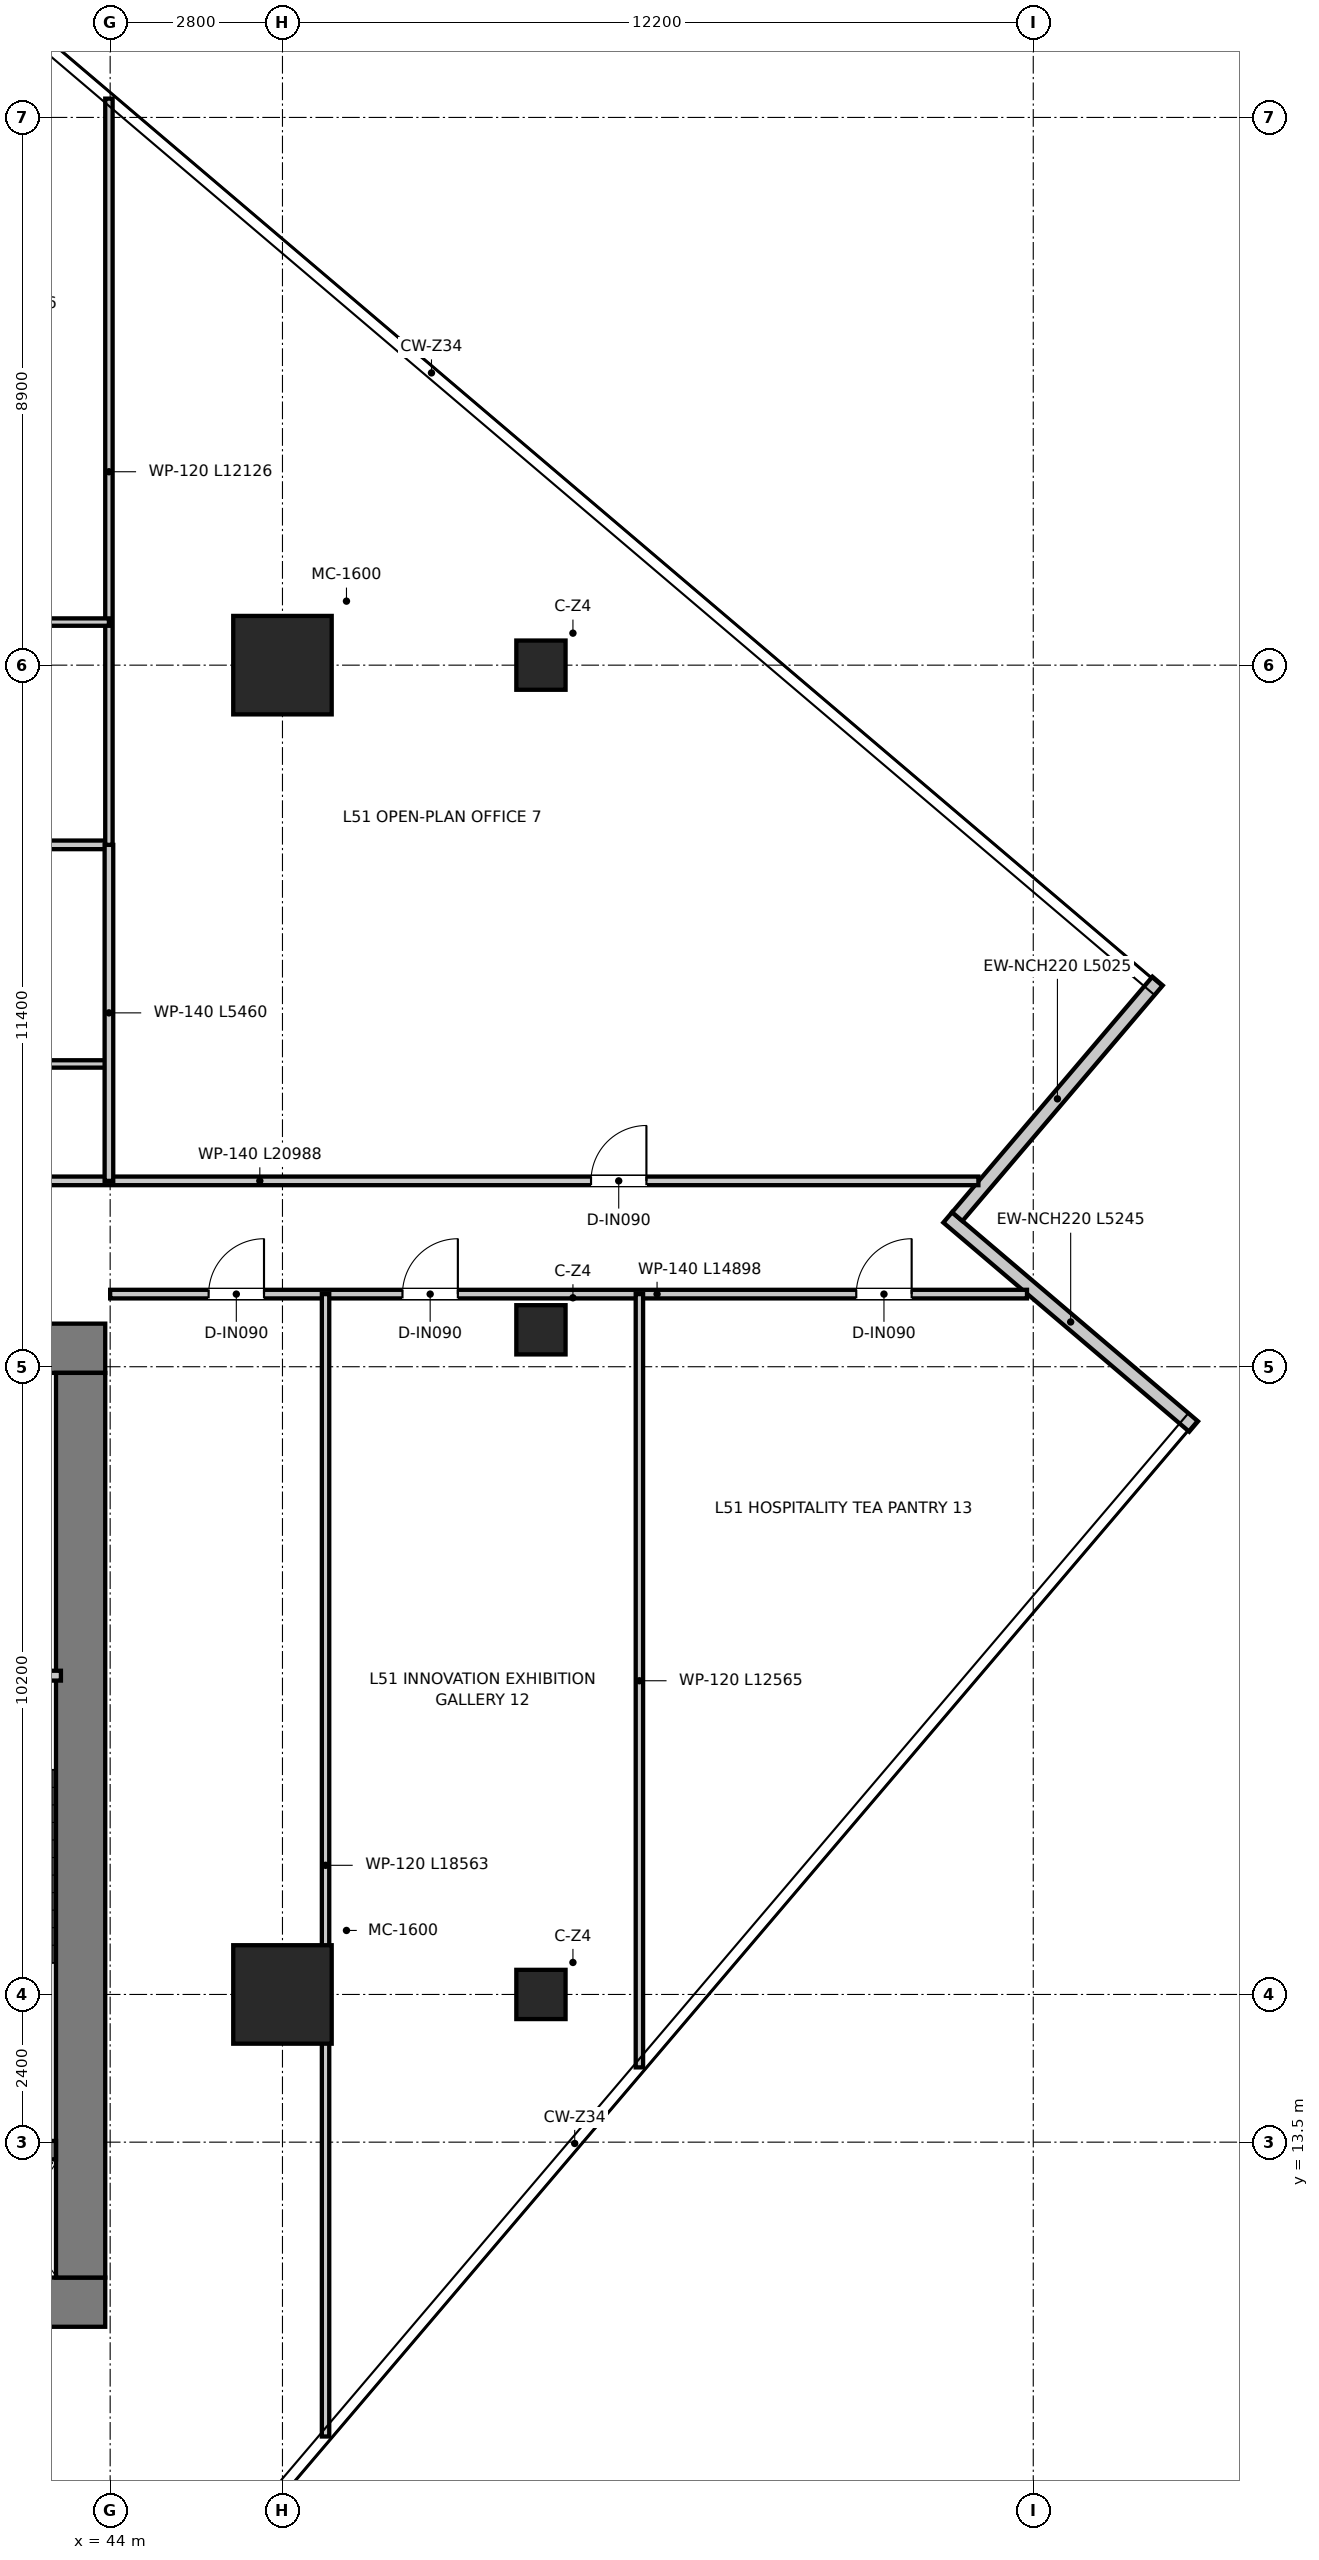
"""IFC4 building model, lengths in metres.
Left out: names, types, materials, properties, quantities, classifications, styles, units other than length and angle.
Written with IfcOpenShell. Run it as: python <this file> out.ifc"""

import sys

from ifc_helpers import new_model, si_unit, direction, frame, frame_2d, origin, origin_2d, place, context, subcontext, project, spatial, rectangle, extrude, source, transform, mapped, element, fill, save


model = new_model("IFC4")
c1 = context("Model", 3, precision=1e-05, world=origin(), true_north=direction((0.0, 1.0)))
c2 = subcontext(c1, "Body", "Model", "MODEL_VIEW")
j1 = project(units=[si_unit("LENGTHUNIT", "METRE"), si_unit("PLANEANGLEUNIT", "RADIAN")], contexts=[c1])
p1 = place(None, origin())
s1 = spatial("IfcSite", under=j1, at=p1, CompositionType="ELEMENT")
p2 = place(p1, origin())
s2 = spatial("IfcBuilding", under=s1, at=p2, CompositionType="ELEMENT")
p3 = place(p2, frame((0.0, 0.0, 211.25)))
s3 = spatial("IfcBuildingStorey", under=s2, at=p3, CompositionType="ELEMENT", Elevation=211.25)
p4 = place(p3, frame((28.08, 10.9, 0.0), z_axis=(0.0, 0.0, 1.0), x_axis=(1.0, 0.0, 0.0)))
e1 = element("IfcWall", 1, at=p4, inside=s3, PredefinedType="SHEAR", context=c2, shape_type="SweptSolid", body=[
    extrude(rectangle(XDim=15.84, YDim=0.8, at=frame_2d((7.92, 0.0))), origin(), (0.0, 0.0, 1.0), 3.95),
])
p5 = place(p3, frame((28.08, 26.4, 0.0), z_axis=(0.0, 0.0, 1.0), x_axis=(1.0, 0.0, 0.0)))
e2 = element("IfcWall", 2, at=p5, inside=s3, PredefinedType="SHEAR", context=c2, shape_type="SweptSolid", body=[
    extrude(rectangle(XDim=15.84, YDim=0.8, at=frame_2d((7.92, 0.0))), origin(), (0.0, 0.0, 1.0), 3.95),
])
p6 = place(p5, frame((7.22, 0.0, 0.0)))
e3 = element("IfcOpeningElement", 3, at=p6, cuts=e2, PredefinedType="OPENING", context=c2, shape_type="SweptSolid", body=[
    extrude(rectangle(XDim=1.4, YDim=2.2, at=frame_2d((0.7, 1.1))), frame((0.0, 0.41, 0.0), z_axis=(0.0, -1.0, 0.0), x_axis=(1.0, 0.0, 0.0)), (0.0, 0.0, 1.0), 0.82),
])
p7 = place(p5, frame((1.775, 0.0, 0.0)))
e4 = element("IfcOpeningElement", 4, at=p7, cuts=e2, PredefinedType="OPENING", context=c2, shape_type="SweptSolid", body=[
    extrude(rectangle(XDim=1.05, YDim=2.1, at=frame_2d((0.525, 1.05))), frame((0.0, 0.41, 0.0), z_axis=(0.0, -1.0, 0.0), x_axis=(1.0, 0.0, 0.0)), (0.0, 0.0, 1.0), 0.82),
])
p8 = place(p5, frame((13.015, 0.0, 0.0)))
e5 = element("IfcOpeningElement", 5, at=p8, cuts=e2, PredefinedType="OPENING", context=c2, shape_type="SweptSolid", body=[
    extrude(rectangle(XDim=1.05, YDim=2.1, at=frame_2d((0.525, 1.05))), frame((0.0, 0.41, 0.0), z_axis=(0.0, -1.0, 0.0), x_axis=(1.0, 0.0, 0.0)), (0.0, 0.0, 1.0), 0.82),
])
p9 = place(p3, frame((43.52, 11.3, 0.0), z_axis=(0.0, 0.0, 1.0), x_axis=(0.0, 1.0, 0.0)))
e6 = element("IfcWall", 6, at=p9, inside=s3, PredefinedType="SHEAR", context=c2, shape_type="SweptSolid", body=[
    extrude(rectangle(XDim=14.7, YDim=0.8, at=frame_2d((7.35, 0.0))), origin(), (0.0, 0.0, 1.0), 3.95),
])
p10 = place(p3, frame((40.02, 13.37, 0.0), z_axis=(0.0, 0.0, 1.0), x_axis=(1.0, 0.0, 0.0)))
e7 = element("IfcWall", 7, at=p10, inside=s3, PredefinedType="SHEAR", context=c2, shape_type="SweptSolid", body=[
    extrude(rectangle(XDim=3.1, YDim=0.3, at=frame_2d((1.55, 0.0))), origin(), (0.0, 0.0, 1.0), 3.95),
])
m1 = source(origin(), c2, "Body", "SweptSolid", [
    extrude(rectangle(XDim=1.6, YDim=1.6, at=origin_2d()), origin(), (0.0, 0.0, 1.0), 3.95),
])
for number, where, z_axis, x_axis in (
    (8, (46.8, 15.9, 0.0), (0.0, 0.0, 1.0), (1.0, 0.0, 0.0)),
    (9, (46.8, 37.5, 0.0), (0.0, 0.0, 1.0), (1.0, 0.0, 0.0)),
):
    element("IfcColumn", number, at=place(p3, frame(where, z_axis=z_axis, x_axis=x_axis)), inside=s3, PredefinedType="USERDEFINED", context=c2, shape_type="MappedRepresentation", body=[
        mapped(m1, transform((0.0, 0.0, 0.0), x_axis=(1.0, 0.0, 0.0), y_axis=(0.0, 1.0, 0.0), z_axis=(0.0, 0.0, 1.0), scale=1.0)),
    ])
m2 = source(origin(), c2, "Body", "SweptSolid", [
    extrude(rectangle(XDim=0.8, YDim=0.8, at=origin_2d()), origin(), (0.0, 0.0, 1.0), 3.95),
])
for number, where, z_axis, x_axis in (
    (10, (51.0, 37.5, 0.0), (0.0, 0.0, 1.0), (1.0, 0.0, 0.0)),
    (11, (51.0, 26.7, 0.0), (0.0, 0.0, 1.0), (1.0, 0.0, 0.0)),
    (12, (51.0, 15.9, 0.0), (0.0, 0.0, 1.0), (1.0, 0.0, 0.0)),
):
    element("IfcColumn", number, at=place(p3, frame(where, z_axis=z_axis, x_axis=x_axis)), inside=s3, PredefinedType="COLUMN", context=c2, shape_type="MappedRepresentation", body=[
        mapped(m2, transform((0.0, 0.0, 0.0), x_axis=(1.0, 0.0, 0.0), y_axis=(0.0, 1.0, 0.0), z_axis=(0.0, 0.0, 1.0), scale=1.0)),
    ])
p11 = place(p3, frame((61.606, 25.129, 0.0), z_axis=(0.0, 0.0, 1.0), x_axis=(-0.761826750047, 0.647780829381, 0.0)))
e13 = element("IfcWall", 13, at=p11, inside=s3, PredefinedType="ELEMENTEDWALL", context=c2, shape_type="SweptSolid", body=[
    extrude(rectangle(XDim=5.245, YDim=0.22, at=frame_2d((2.623, 0.0))), origin(), (0.0, 0.0, 1.0), 3.67),
])
p12 = place(p3, frame((57.765, 28.539, 0.0), z_axis=(0.0, 0.0, 1.0), x_axis=(0.647789440707, 0.761819427757, 0.0)))
e14 = element("IfcWall", 14, at=p12, inside=s3, PredefinedType="ELEMENTEDWALL", context=c2, shape_type="SweptSolid", body=[
    extrude(rectangle(XDim=5.025, YDim=0.22, at=frame_2d((2.512, 0.0))), origin(), (0.0, 0.0, 1.0), 3.67),
])
p13 = place(p3, frame((40.04, 21.08, 0.0), z_axis=(0.0, 0.0, 1.0), x_axis=(1.0, 0.0, 0.0)))
e15 = element("IfcWall", 15, at=p13, inside=s3, PredefinedType="PARTITIONING", context=c2, shape_type="SweptSolid", body=[
    extrude(rectangle(XDim=3.16, YDim=0.16, at=frame_2d((1.58, 0.0))), origin(), (0.0, 0.0, 1.0), 3.67),
])
p14 = place(p13, frame((1.055, 0.0, 0.0)))
e16 = element("IfcOpeningElement", 16, at=p14, cuts=e15, PredefinedType="OPENING", context=c2, shape_type="SweptSolid", body=[
    extrude(rectangle(XDim=1.05, YDim=2.1, at=frame_2d((0.525, 1.05))), frame((0.0, 0.09, 0.0), z_axis=(0.0, -1.0, 0.0), x_axis=(1.0, 0.0, 0.0)), (0.0, 0.0, 1.0), 0.18),
])
p15 = place(p3, frame((37.12, 29.12, 0.0), z_axis=(0.0, 0.0, 1.0), x_axis=(1.0, 0.0, 0.0)))
e17 = element("IfcWall", 17, at=p15, inside=s3, PredefinedType="PARTITIONING", context=c2, shape_type="SweptSolid", body=[
    extrude(rectangle(XDim=20.988, YDim=0.14, at=frame_2d((10.494, 0.0))), origin(), (0.0, 0.0, 1.0), 3.03),
])
p16 = place(p15, frame((3.03, 0.0, 0.0)))
e18 = element("IfcOpeningElement", 18, at=p16, cuts=e17, PredefinedType="OPENING", context=c2, shape_type="SweptSolid", body=[
    extrude(rectangle(XDim=0.9, YDim=2.1, at=frame_2d((0.45, 1.05))), frame((0.0, 0.08, 0.0), z_axis=(0.0, -1.0, 0.0), x_axis=(1.0, 0.0, 0.0)), (0.0, 0.0, 1.0), 0.16),
])
p17 = place(p15, frame((14.694, 0.0, 0.0)))
e19 = element("IfcOpeningElement", 19, at=p17, cuts=e17, PredefinedType="OPENING", context=c2, shape_type="SweptSolid", body=[
    extrude(rectangle(XDim=0.9, YDim=2.1, at=frame_2d((0.45, 1.05))), frame((0.0, 0.08, 0.0), z_axis=(0.0, -1.0, 0.0), x_axis=(1.0, 0.0, 0.0)), (0.0, 0.0, 1.0), 0.16),
])
p18 = place(p3, frame((44.0, 27.28, 0.0), z_axis=(0.0, 0.0, 1.0), x_axis=(1.0, 0.0, 0.0)))
e20 = element("IfcWall", 20, at=p18, inside=s3, PredefinedType="PARTITIONING", context=c2, shape_type="SweptSolid", body=[
    extrude(rectangle(XDim=14.898, YDim=0.14, at=frame_2d((7.449, 0.0))), origin(), (0.0, 0.0, 1.0), 3.03),
])
p19 = place(p18, frame((1.6, 0.0, 0.0)))
e21 = element("IfcOpeningElement", 21, at=p19, cuts=e20, PredefinedType="OPENING", context=c2, shape_type="SweptSolid", body=[
    extrude(rectangle(XDim=0.9, YDim=2.1, at=frame_2d((0.45, 1.05))), frame((0.0, 0.08, 0.0), z_axis=(0.0, -1.0, 0.0), x_axis=(1.0, 0.0, 0.0)), (0.0, 0.0, 1.0), 0.16),
])
p20 = place(p18, frame((4.75, 0.0, 0.0)))
e22 = element("IfcOpeningElement", 22, at=p20, cuts=e20, PredefinedType="OPENING", context=c2, shape_type="SweptSolid", body=[
    extrude(rectangle(XDim=0.9, YDim=2.1, at=frame_2d((0.45, 1.05))), frame((0.0, 0.08, 0.0), z_axis=(0.0, -1.0, 0.0), x_axis=(1.0, 0.0, 0.0)), (0.0, 0.0, 1.0), 0.16),
])
p21 = place(p18, frame((12.124, 0.0, 0.0)))
e23 = element("IfcOpeningElement", 23, at=p21, cuts=e20, PredefinedType="OPENING", context=c2, shape_type="SweptSolid", body=[
    extrude(rectangle(XDim=0.9, YDim=2.1, at=frame_2d((0.45, 1.05))), frame((0.0, 0.08, 0.0), z_axis=(0.0, -1.0, 0.0), x_axis=(1.0, 0.0, 0.0)), (0.0, 0.0, 1.0), 0.16),
])
p22 = place(p3, frame((37.12, 31.02, 0.0), z_axis=(0.0, 0.0, 1.0), x_axis=(1.0, 0.0, 0.0)))
e24 = element("IfcWall", 24, at=p22, inside=s3, PredefinedType="PARTITIONING", context=c2, shape_type="SweptSolid", body=[
    extrude(rectangle(XDim=6.86, YDim=0.12, at=frame_2d((3.43, 0.0))), origin(), (0.0, 0.0, 1.0), 3.18),
])
p23 = place(p3, frame((37.12, 34.58, 0.0), z_axis=(0.0, 0.0, 1.0), x_axis=(1.0, 0.0, 0.0)))
e25 = element("IfcWall", 25, at=p23, inside=s3, PredefinedType="PARTITIONING", context=c2, shape_type="SweptSolid", body=[
    extrude(rectangle(XDim=6.86, YDim=0.14, at=frame_2d((3.43, 0.0))), origin(), (0.0, 0.0, 1.0), 3.18),
])
p24 = place(p3, frame((43.98, 29.12, 0.0), z_axis=(0.0, 0.0, 1.0), x_axis=(0.0, 1.0, 0.0)))
e26 = element("IfcWall", 26, at=p24, inside=s3, PredefinedType="PARTITIONING", context=c2, shape_type="SweptSolid", body=[
    extrude(rectangle(XDim=5.46, YDim=0.14, at=frame_2d((2.73, 0.0))), origin(), (0.0, 0.0, 1.0), 3.37),
])
p25 = place(p3, frame((43.98, 34.58, 0.0), z_axis=(0.0, 0.0, 1.0), x_axis=(0.0, 1.0, 0.0)))
e27 = element("IfcWall", 27, at=p25, inside=s3, PredefinedType="PARTITIONING", context=c2, shape_type="SweptSolid", body=[
    extrude(rectangle(XDim=12.125, YDim=0.12, at=frame_2d((6.063, 0.0))), origin(), (0.0, 0.0, 1.0), 3.03),
])
p26 = place(p3, frame((37.12, 38.2, 0.0), z_axis=(0.0, 0.0, 1.0), x_axis=(1.0, 0.0, 0.0)))
e28 = element("IfcWall", 28, at=p26, inside=s3, PredefinedType="PARTITIONING", context=c2, shape_type="SweptSolid", body=[
    extrude(rectangle(XDim=6.86, YDim=0.12, at=frame_2d((3.43, 0.0))), origin(), (0.0, 0.0, 1.0), 3.18),
])
p27 = place(p3, frame((47.5, 8.717, 0.0), z_axis=(0.0, 0.0, 1.0), x_axis=(0.0, 1.0, 0.0)))
e29 = element("IfcWall", 29, at=p27, inside=s3, PredefinedType="PARTITIONING", context=c2, shape_type="SweptSolid", body=[
    extrude(rectangle(XDim=18.563, YDim=0.12, at=frame_2d((9.281, 0.0))), origin(), (0.0, 0.0, 1.0), 3.18),
])
p28 = place(p3, frame((52.6, 14.715, 0.0), z_axis=(0.0, 0.0, 1.0), x_axis=(0.0, 1.0, 0.0)))
e30 = element("IfcWall", 30, at=p28, inside=s3, PredefinedType="PARTITIONING", context=c2, shape_type="SweptSolid", body=[
    extrude(rectangle(XDim=12.565, YDim=0.12, at=frame_2d((6.283, 0.0))), origin(), (0.0, 0.0, 1.0), 3.67),
])
p29 = place(p17, origin())
e31 = element("IfcDoor", 31, at=p29, inside=s3, OperationType="SINGLE_SWING_RIGHT", PredefinedType="DOOR", context=c2, shape_type="SweptSolid", body=[
    extrude(rectangle(XDim=0.9, YDim=2.1, at=frame_2d((0.45, 1.05))), frame((0.0, 0.025, 0.0), z_axis=(0.0, -1.0, 0.0), x_axis=(1.0, 0.0, 0.0)), (0.0, 0.0, 1.0), 0.05),
])
fill(e19, e31)
p30 = place(p19, origin())
e32 = element("IfcDoor", 32, at=p30, inside=s3, OperationType="SINGLE_SWING_RIGHT", PredefinedType="DOOR", context=c2, shape_type="SweptSolid", body=[
    extrude(rectangle(XDim=0.9, YDim=2.1, at=frame_2d((0.45, 1.05))), frame((0.0, 0.025, 0.0), z_axis=(0.0, -1.0, 0.0), x_axis=(1.0, 0.0, 0.0)), (0.0, 0.0, 1.0), 0.05),
])
fill(e21, e32)
p31 = place(p20, origin())
e33 = element("IfcDoor", 33, at=p31, inside=s3, OperationType="SINGLE_SWING_RIGHT", PredefinedType="DOOR", context=c2, shape_type="SweptSolid", body=[
    extrude(rectangle(XDim=0.9, YDim=2.1, at=frame_2d((0.45, 1.05))), frame((0.0, 0.025, 0.0), z_axis=(0.0, -1.0, 0.0), x_axis=(1.0, 0.0, 0.0)), (0.0, 0.0, 1.0), 0.05),
])
fill(e22, e33)
p32 = place(p21, origin())
e34 = element("IfcDoor", 34, at=p32, inside=s3, OperationType="SINGLE_SWING_RIGHT", PredefinedType="DOOR", context=c2, shape_type="SweptSolid", body=[
    extrude(rectangle(XDim=0.9, YDim=2.1, at=frame_2d((0.45, 1.05))), frame((0.0, 0.025, 0.0), z_axis=(0.0, -1.0, 0.0), x_axis=(1.0, 0.0, 0.0)), (0.0, 0.0, 1.0), 0.05),
])
fill(e23, e34)
save(model, sys.argv[1])
